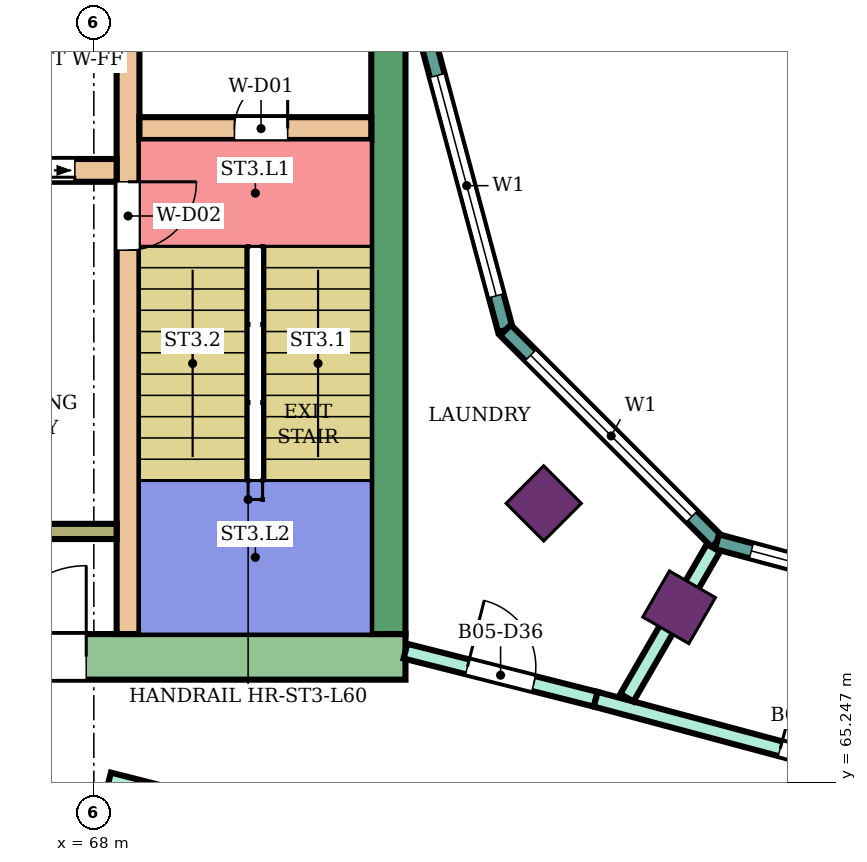
"""IFC4 building model, lengths in metres.
Left out: names, types, materials, properties, quantities, classifications, styles, units other than length and angle.
Written with IfcOpenShell. Run it as: python <this file> out.ifc"""

import sys

from ifc_helpers import new_model, si_unit, direction, frame, frame_2d, origin, origin_2d, place, context, subcontext, project, spatial, rectangle, extrude, element, fill, save


model = new_model("IFC4")
c1 = context("Model", 3, precision=1e-05, world=origin(), true_north=direction((0.0, 1.0)))
c2 = subcontext(c1, "Body", "Model", "MODEL_VIEW")
j1 = project(units=[si_unit("LENGTHUNIT", "METRE"), si_unit("PLANEANGLEUNIT", "RADIAN")], contexts=[c1])
p1 = place(None, origin())
s1 = spatial("IfcSite", under=j1, at=p1, CompositionType="ELEMENT")
p2 = place(p1, origin())
s2 = spatial("IfcBuilding", under=s1, at=p2, CompositionType="ELEMENT")
p3 = place(p2, frame((0.0, 0.0, 262.5)))
s3 = spatial("IfcBuildingStorey", under=s2, at=p3, CompositionType="ELEMENT", Elevation=262.5)
for number, where, z_axis, x_axis in (
    (1, (73.919, 68.919, 0.0), (0.0, 0.0, 1.0), (-0.707, -0.707, 0.0)),
    (2, (75.7, 67.552, 0.0), (0.0, 0.0, 1.0), (-0.5, -0.866, 0.0)),
):
    element("IfcColumn", number, at=place(p3, frame(where, z_axis=z_axis, x_axis=x_axis)), inside=s3, PredefinedType="COLUMN", context=c2, shape_type="SweptSolid", body=[
        extrude(rectangle(XDim=0.7, YDim=0.7, at=origin_2d()), origin(), (0.0, 0.0, 1.0), 4.2),
    ])
p4 = place(p3, frame((72.1, 66.9, 0.0), z_axis=(0.0, 0.0, 1.0), x_axis=(-1.0, 0.0, 0.0)))
e3 = element("IfcWall", 3, at=p4, inside=s3, PredefinedType="SHEAR", context=c2, shape_type="SweptSolid", body=[
    extrude(rectangle(XDim=14.9, YDim=0.6, at=frame_2d((7.45, 0.0))), origin(), (0.0, 0.0, 1.0), 3.88),
])
p5 = place(p4, frame((4.2, 0.0, 0.0)))
e4 = element("IfcOpeningElement", 4, at=p5, cuts=e3, PredefinedType="OPENING", context=c2, shape_type="SweptSolid", body=[
    extrude(rectangle(XDim=2.4, YDim=2.4, at=frame_2d((1.2, 1.2))), frame((0.0, 0.31, 0.0), z_axis=(0.0, -1.0, 0.0), x_axis=(1.0, 0.0, 0.0)), (0.0, 0.0, 1.0), 0.62),
])
p6 = place(p3, frame((71.875, 75.0, 0.0), z_axis=(0.0, 0.0, 1.0), x_axis=(0.0, -1.0, 0.0)))
e5 = element("IfcWall", 5, at=p6, inside=s3, PredefinedType="SHEAR", context=c2, shape_type="SweptSolid", body=[
    extrude(rectangle(XDim=7.8, YDim=0.45, at=frame_2d((3.9, 0.0))), origin(), (0.0, 0.0, 1.0), 3.88),
])
p7 = place(p3, frame((68.45, 75.0, 0.0), z_axis=(0.0, 0.0, 1.0), x_axis=(0.0, -1.0, 0.0)))
e6 = element("IfcWall", 6, at=p7, inside=s3, PredefinedType="SHEAR", context=c2, shape_type="SweptSolid", body=[
    extrude(rectangle(XDim=7.8, YDim=0.3, at=frame_2d((3.9, 0.0))), origin(), (0.0, 0.0, 1.0), 3.88),
])
p8 = place(p7, frame((1.85, 0.0, 0.0)))
e7 = element("IfcOpeningElement", 7, at=p8, cuts=e6, PredefinedType="OPENING", context=c2, shape_type="SweptSolid", body=[
    extrude(rectangle(XDim=0.9, YDim=2.1, at=frame_2d((0.45, 1.05))), frame((0.0, 0.16, 0.0), z_axis=(0.0, -1.0, 0.0), x_axis=(1.0, 0.0, 0.0)), (0.0, 0.0, 1.0), 0.32),
])
p9 = place(p3, frame((71.65, 73.85, 0.0), z_axis=(0.0, 0.0, 1.0), x_axis=(-1.0, 0.0, 0.0)))
e8 = element("IfcWall", 8, at=p9, inside=s3, PredefinedType="SHEAR", context=c2, shape_type="SweptSolid", body=[
    extrude(rectangle(XDim=3.05, YDim=0.3, at=frame_2d((1.525, 0.0))), origin(), (0.0, 0.0, 1.0), 3.88),
])
p10 = place(p9, frame((1.1, 0.0, 0.0)))
e9 = element("IfcOpeningElement", 9, at=p10, cuts=e8, PredefinedType="OPENING", context=c2, shape_type="SweptSolid", body=[
    extrude(rectangle(XDim=0.7, YDim=2.0, at=frame_2d((0.35, 1.0))), frame((0.0, 0.16, 0.0), z_axis=(0.0, -1.0, 0.0), x_axis=(1.0, 0.0, 0.0)), (0.0, 0.0, 1.0), 0.32),
])
p11 = place(p3, frame((68.3, 73.3, 0.0), z_axis=(0.0, 0.0, 1.0), x_axis=(-1.0, 0.0, 0.0)))
e10 = element("IfcWall", 10, at=p11, inside=s3, PredefinedType="SHEAR", context=c2, shape_type="SweptSolid", body=[
    extrude(rectangle(XDim=11.1, YDim=0.3, at=frame_2d((5.55, 0.0))), origin(), (0.0, 0.0, 1.0), 3.88),
])
p12 = place(p11, frame((0.55, 0.0, 0.0)))
e11 = element("IfcOpeningElement", 11, at=p12, cuts=e10, PredefinedType="OPENING", context=c2, shape_type="SweptSolid", body=[
    extrude(rectangle(XDim=1.1, YDim=2.1, at=frame_2d((0.55, 1.05))), frame((0.0, 0.16, 0.0), z_axis=(0.0, -1.0, 0.0), x_axis=(1.0, 0.0, 0.0)), (0.0, 0.0, 1.0), 0.32),
])
p13 = place(p11, frame((3.0, 0.0, 0.0)))
e12 = element("IfcOpeningElement", 12, at=p13, cuts=e10, PredefinedType="OPENING", context=c2, shape_type="SweptSolid", body=[
    extrude(rectangle(XDim=1.2, YDim=2.1, at=frame_2d((0.6, 1.05))), frame((0.0, 0.16, 0.0), z_axis=(0.0, -1.0, 0.0), x_axis=(1.0, 0.0, 0.0)), (0.0, 0.0, 1.0), 0.32),
])
p14 = place(p11, frame((5.5, 0.0, 0.0)))
e13 = element("IfcOpeningElement", 13, at=p14, cuts=e10, PredefinedType="OPENING", context=c2, shape_type="SweptSolid", body=[
    extrude(rectangle(XDim=1.2, YDim=2.1, at=frame_2d((0.6, 1.05))), frame((0.0, 0.16, 0.0), z_axis=(0.0, -1.0, 0.0), x_axis=(1.0, 0.0, 0.0)), (0.0, 0.0, 1.0), 0.32),
])
p15 = place(p11, frame((8.85, 0.0, 0.0)))
e14 = element("IfcOpeningElement", 14, at=p15, cuts=e10, PredefinedType="OPENING", context=c2, shape_type="SweptSolid", body=[
    extrude(rectangle(XDim=0.9, YDim=2.1, at=frame_2d((0.45, 1.05))), frame((0.0, 0.16, 0.0), z_axis=(0.0, -1.0, 0.0), x_axis=(1.0, 0.0, 0.0)), (0.0, 0.0, 1.0), 0.32),
])
p16 = place(p3, frame((68.3, 68.55, 0.0), z_axis=(0.0, 0.0, 1.0), x_axis=(-1.0, 0.0, 0.0)))
e15 = element("IfcWall", 15, at=p16, inside=s3, PredefinedType="SHEAR", context=c2, shape_type="SweptSolid", body=[
    extrude(rectangle(XDim=4.35, YDim=0.2, at=frame_2d((2.175, 0.0))), origin(), (0.0, 0.0, 1.0), 3.88),
])
p17 = place(p3, frame((72.396, 75.0, 0.0), z_axis=(0.0, 0.0, 1.0), x_axis=(0.258789828301, -0.965933654434, 0.0)))
e16 = element("IfcWall", 16, at=p17, inside=s3, PredefinedType="NOTDEFINED", context=c2, shape_type="SweptSolid", body=[
    extrude(rectangle(XDim=3.936, YDim=0.2, at=frame_2d((1.968, 0.0))), origin(), (0.0, 0.0, 1.0), 4.2),
])
p18 = place(p17, frame((0.468, 0.0, 0.9)))
e17 = element("IfcOpeningElement", 17, at=p18, cuts=e16, PredefinedType="OPENING", context=c2, shape_type="SweptSolid", body=[
    extrude(rectangle(XDim=3.0, YDim=2.3, at=frame_2d((1.5, 1.15))), frame((0.0, 0.11, 0.0), z_axis=(0.0, -1.0, 0.0), x_axis=(1.0, 0.0, 0.0)), (0.0, 0.0, 1.0), 0.22),
])
p19 = place(p3, frame((73.415, 71.198, 0.0), z_axis=(0.0, 0.0, 1.0), x_axis=(0.707106781187, -0.707106781187, 0.0)))
e18 = element("IfcWall", 18, at=p19, inside=s3, PredefinedType="NOTDEFINED", context=c2, shape_type="SweptSolid", body=[
    extrude(rectangle(XDim=3.936, YDim=0.2, at=frame_2d((1.968, 0.0))), origin(), (0.0, 0.0, 1.0), 4.2),
])
p20 = place(p19, frame((0.468, 0.0, 0.9)))
e19 = element("IfcOpeningElement", 19, at=p20, cuts=e18, PredefinedType="OPENING", context=c2, shape_type="SweptSolid", body=[
    extrude(rectangle(XDim=3.0, YDim=2.3, at=frame_2d((1.5, 1.15))), frame((0.0, 0.11, 0.0), z_axis=(0.0, -1.0, 0.0), x_axis=(1.0, 0.0, 0.0)), (0.0, 0.0, 1.0), 0.22),
])
p21 = place(p3, frame((76.198, 68.415, 0.0), z_axis=(0.0, 0.0, 1.0), x_axis=(0.965933654434, -0.258789828301, 0.0)))
e20 = element("IfcWall", 20, at=p21, inside=s3, PredefinedType="NOTDEFINED", context=c2, shape_type="SweptSolid", body=[
    extrude(rectangle(XDim=3.936, YDim=0.2, at=frame_2d((1.968, 0.0))), origin(), (0.0, 0.0, 1.0), 4.2),
])
p22 = place(p21, frame((0.468, 0.0, 0.9)))
e21 = element("IfcOpeningElement", 21, at=p22, cuts=e20, PredefinedType="OPENING", context=c2, shape_type="SweptSolid", body=[
    extrude(rectangle(XDim=3.0, YDim=2.3, at=frame_2d((1.5, 1.15))), frame((0.0, 0.11, 0.0), z_axis=(0.0, -1.0, 0.0), x_axis=(1.0, 0.0, 0.0)), (0.0, 0.0, 1.0), 0.22),
])
p23 = place(p3, frame((68.2, 65.28, 0.0), z_axis=(0.0, 0.0, 1.0), x_axis=(0.969428528216, -0.245373854926, 0.0)))
e22 = element("IfcWall", 22, at=p23, inside=s3, PredefinedType="PARTITIONING", context=c2, shape_type="SweptSolid", body=[
    extrude(rectangle(XDim=5.928, YDim=0.2, at=frame_2d((2.964, 0.0))), origin(), (0.0, 0.0, 1.0), 3.75),
])
p24 = place(p23, frame((3.309, 0.0, 0.0)))
e23 = element("IfcOpeningElement", 23, at=p24, cuts=e22, PredefinedType="OPENING", context=c2, shape_type="SweptSolid", body=[
    extrude(rectangle(XDim=1.0, YDim=2.1, at=frame_2d((0.5, 1.05))), frame((0.0, 0.11, 0.0), z_axis=(0.0, -1.0, 0.0), x_axis=(1.0, 0.0, 0.0)), (0.0, 0.0, 1.0), 0.22),
])
p25 = place(p3, frame((72.1, 66.975, 0.0), z_axis=(0.0, 0.0, 1.0), x_axis=(0.969471314457, -0.245204752086, 0.0)))
e24 = element("IfcWall", 24, at=p25, inside=s3, PredefinedType="PARTITIONING", context=c2, shape_type="SweptSolid", body=[
    extrude(rectangle(XDim=2.582, YDim=0.2, at=frame_2d((1.291, 0.0))), origin(), (0.0, 0.0, 1.0), 3.75),
])
p26 = place(p25, frame((0.841, 0.0, 0.0)))
e25 = element("IfcOpeningElement", 25, at=p26, cuts=e24, PredefinedType="OPENING", context=c2, shape_type="SweptSolid", body=[
    extrude(rectangle(XDim=0.9, YDim=2.1, at=frame_2d((0.45, 1.05))), frame((0.0, 0.11, 0.0), z_axis=(0.0, -1.0, 0.0), x_axis=(1.0, 0.0, 0.0)), (0.0, 0.0, 1.0), 0.22),
])
p27 = place(p3, frame((74.603, 66.342, 0.0), z_axis=(0.0, 0.0, 1.0), x_axis=(0.965920893652, -0.258837453254, 0.0)))
e26 = element("IfcWall", 26, at=p27, inside=s3, PredefinedType="PARTITIONING", context=c2, shape_type="SweptSolid", body=[
    extrude(rectangle(XDim=5.458, YDim=0.2, at=frame_2d((2.729, 0.0))), origin(), (0.0, 0.0, 1.0), 3.75),
])
p28 = place(p27, frame((2.512, 0.0, 0.0)))
e27 = element("IfcOpeningElement", 27, at=p28, cuts=e26, PredefinedType="OPENING", context=c2, shape_type="SweptSolid", body=[
    extrude(rectangle(XDim=0.9, YDim=2.1, at=frame_2d((0.45, 1.05))), frame((0.0, 0.11, 0.0), z_axis=(0.0, -1.0, 0.0), x_axis=(1.0, 0.0, 0.0)), (0.0, 0.0, 1.0), 0.22),
])
p29 = place(p3, frame((75.013, 66.363, 0.0), z_axis=(0.0, 0.0, 1.0), x_axis=(0.500097042406, 0.865969369075, 0.0)))
e28 = element("IfcWall", 28, at=p29, inside=s3, PredefinedType="PARTITIONING", context=c2, shape_type="SweptSolid", body=[
    extrude(rectangle(XDim=2.275, YDim=0.2, at=frame_2d((1.138, 0.0))), origin(), (0.0, 0.0, 1.0), 3.75),
])
p30 = place(p18, origin())
e29 = element("IfcWindow", 29, at=p30, inside=s3, PartitioningType="SINGLE_PANEL", PredefinedType="WINDOW", context=c2, shape_type="SweptSolid", body=[
    extrude(rectangle(XDim=3.0, YDim=2.3, at=frame_2d((1.5, 1.15))), frame((0.0, 0.03, 0.0), z_axis=(0.0, -1.0, 0.0), x_axis=(1.0, 0.0, 0.0)), (0.0, 0.0, 1.0), 0.06),
])
fill(e17, e29)
p31 = place(p20, origin())
e30 = element("IfcWindow", 30, at=p31, inside=s3, PartitioningType="SINGLE_PANEL", PredefinedType="WINDOW", context=c2, shape_type="SweptSolid", body=[
    extrude(rectangle(XDim=3.0, YDim=2.3, at=frame_2d((1.5, 1.15))), frame((0.0, 0.03, 0.0), z_axis=(0.0, -1.0, 0.0), x_axis=(1.0, 0.0, 0.0)), (0.0, 0.0, 1.0), 0.06),
])
fill(e19, e30)
p32 = place(p22, origin())
e31 = element("IfcWindow", 31, at=p32, inside=s3, PartitioningType="SINGLE_PANEL", PredefinedType="WINDOW", context=c2, shape_type="SweptSolid", body=[
    extrude(rectangle(XDim=3.0, YDim=2.3, at=frame_2d((1.5, 1.15))), frame((0.0, 0.03, 0.0), z_axis=(0.0, -1.0, 0.0), x_axis=(1.0, 0.0, 0.0)), (0.0, 0.0, 1.0), 0.06),
])
fill(e21, e31)
p33 = place(p28, origin())
e32 = element("IfcDoor", 32, at=p33, inside=s3, OperationType="SINGLE_SWING_LEFT", PredefinedType="DOOR", context=c2, shape_type="SweptSolid", body=[
    extrude(rectangle(XDim=0.9, YDim=2.1, at=frame_2d((0.45, 1.05))), frame((0.0, 0.025, 0.0), z_axis=(0.0, -1.0, 0.0), x_axis=(1.0, 0.0, 0.0)), (0.0, 0.0, 1.0), 0.05),
])
fill(e27, e32)
p34 = place(p26, origin())
e33 = element("IfcDoor", 33, at=p34, inside=s3, OperationType="SINGLE_SWING_LEFT", PredefinedType="DOOR", context=c2, shape_type="SweptSolid", body=[
    extrude(rectangle(XDim=0.9, YDim=2.1, at=frame_2d((0.45, 1.05))), frame((0.0, 0.025, 0.0), z_axis=(0.0, -1.0, 0.0), x_axis=(1.0, 0.0, 0.0)), (0.0, 0.0, 1.0), 0.05),
])
fill(e25, e33)
p35 = place(p10, frame((0.7, 0.0, 0.0), z_axis=(0.0, 0.0, 1.0), x_axis=(-1.0, 0.0, 0.0)))
e34 = element("IfcDoor", 34, at=p35, inside=s3, OperationType="SINGLE_SWING_RIGHT", PredefinedType="DOOR", context=c2, shape_type="SweptSolid", body=[
    extrude(rectangle(XDim=0.7, YDim=2.0, at=frame_2d((0.35, 1.0))), frame((0.0, 0.025, 0.0), z_axis=(0.0, -1.0, 0.0), x_axis=(1.0, 0.0, 0.0)), (0.0, 0.0, 1.0), 0.05),
])
fill(e9, e34)
p36 = place(p8, origin())
e35 = element("IfcDoor", 35, at=p36, inside=s3, OperationType="SINGLE_SWING_LEFT", PredefinedType="DOOR", context=c2, shape_type="SweptSolid", body=[
    extrude(rectangle(XDim=0.9, YDim=2.1, at=frame_2d((0.45, 1.05))), frame((0.0, 0.025, 0.0), z_axis=(0.0, -1.0, 0.0), x_axis=(1.0, 0.0, 0.0)), (0.0, 0.0, 1.0), 0.05),
])
fill(e7, e35)
p37 = place(p12, origin())
e36 = element("IfcDoor", 36, at=p37, inside=s3, OperationType="DOUBLE_DOOR_SLIDING", PredefinedType="DOOR", context=c2, shape_type="SweptSolid", body=[
    extrude(rectangle(XDim=1.1, YDim=2.1, at=frame_2d((0.55, 1.05))), frame((0.0, 0.025, 0.0), z_axis=(0.0, -1.0, 0.0), x_axis=(1.0, 0.0, 0.0)), (0.0, 0.0, 1.0), 0.05),
])
fill(e11, e36)
p38 = place(p5, frame((2.4, 0.0, 0.0), z_axis=(0.0, 0.0, 1.0), x_axis=(-1.0, 0.0, 0.0)))
e37 = element("IfcDoor", 37, at=p38, inside=s3, OperationType="DOUBLE_DOOR_SINGLE_SWING", PredefinedType="DOOR", context=c2, shape_type="SweptSolid", body=[
    extrude(rectangle(XDim=2.4, YDim=2.4, at=frame_2d((1.2, 1.2))), frame((0.0, 0.025, 0.0), z_axis=(0.0, -1.0, 0.0), x_axis=(1.0, 0.0, 0.0)), (0.0, 0.0, 1.0), 0.05),
])
fill(e4, e37)
save(model, sys.argv[1])
